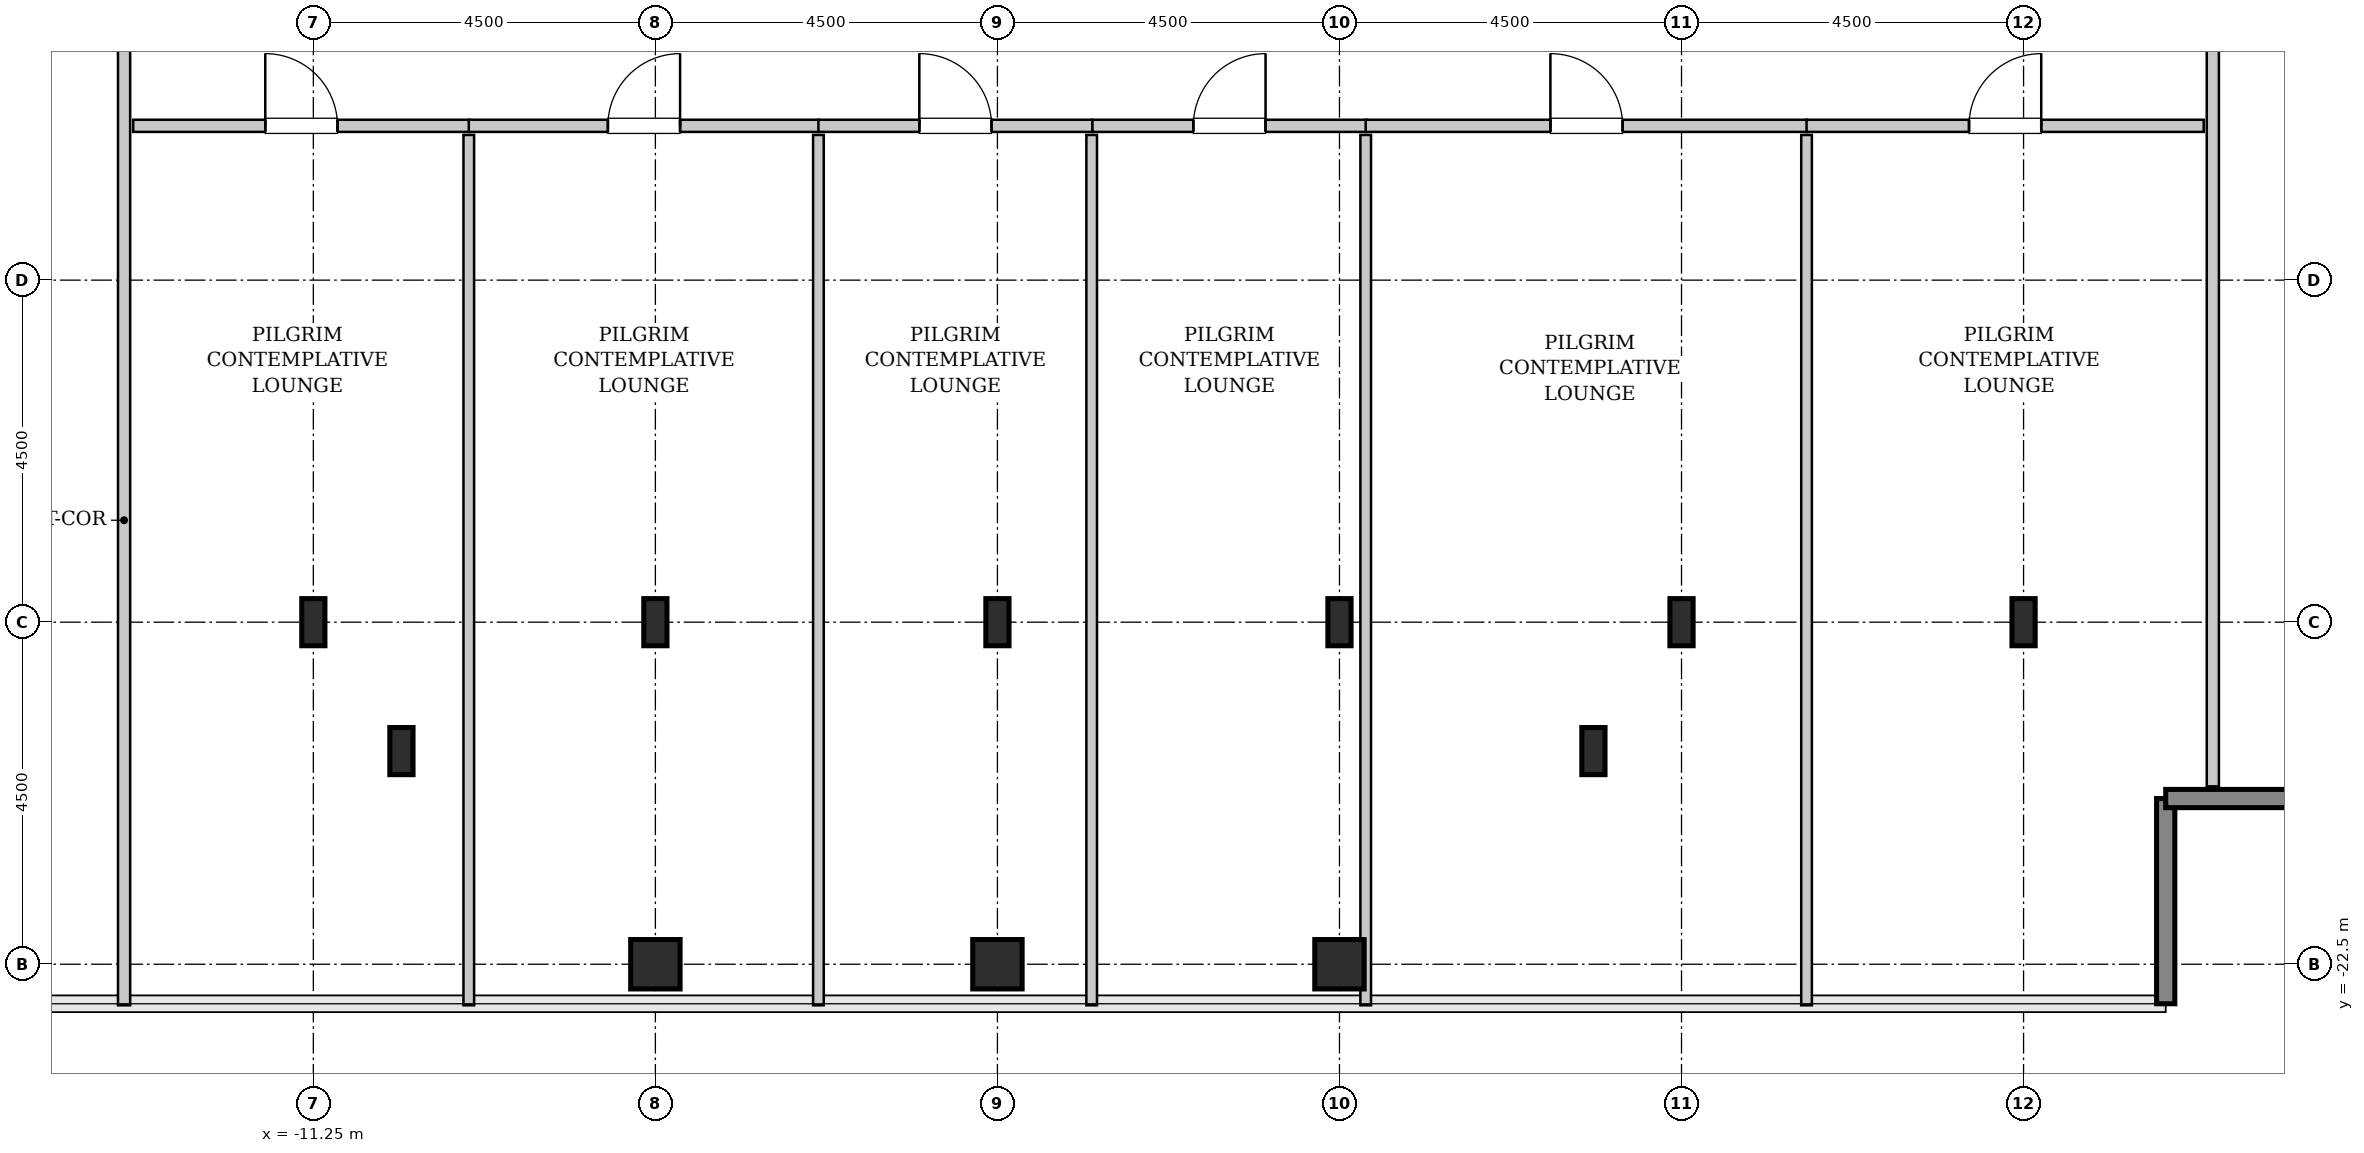
"""IFC4 building model, lengths in metres.
Left out: names, types, materials, properties, quantities, classifications, styles, units other than length and angle.
Written with IfcOpenShell. Run it as: python <this file> out.ifc"""

import sys

from ifc_helpers import new_model, si_unit, direction, frame, frame_2d, origin, origin_2d, place, context, subcontext, project, spatial, rectangle, hollow_rectangle, i_section, extrude, source, transform, mapped, element, fill, save


model = new_model("IFC4")
c1 = context("Model", 3, precision=1e-05, world=origin(), true_north=direction((0.0, 1.0)))
c2 = subcontext(c1, "Body", "Model", "MODEL_VIEW")
j1 = project(units=[si_unit("LENGTHUNIT", "METRE"), si_unit("PLANEANGLEUNIT", "RADIAN")], contexts=[c1])
p1 = place(None, origin())
s1 = spatial("IfcSite", under=j1, at=p1, CompositionType="ELEMENT")
p2 = place(p1, origin())
s2 = spatial("IfcBuilding", under=s1, at=p2, CompositionType="ELEMENT")
p3 = place(p2, frame((0.0, 0.0, 272.2)))
s3 = spatial("IfcBuildingStorey", under=s2, at=p3, CompositionType="ELEMENT", Elevation=272.2)
m1 = source(origin(), c2, "Body", "SweptSolid", [
    extrude(i_section(OverallWidth=0.305, OverallDepth=0.62, WebThickness=0.021, FlangeThickness=0.04, FilletRadius=0.027, at=origin_2d()), origin(), (0.0, 0.0, 1.0), 3.8),
])
for number, where, z_axis, x_axis in (
    (1, (-11.25, -18.0, 0.0), (0.0, 0.0, 1.0), (1.0, 0.0, 0.0)),
    (2, (-10.091, -19.696, 0.0), (0.0, 0.0, 1.0), (1.0, 0.0, 0.0)),
):
    element("IfcColumn", number, at=place(p3, frame(where, z_axis=z_axis, x_axis=x_axis)), inside=s3, PredefinedType="COLUMN", context=c2, shape_type="MappedRepresentation", body=[
        mapped(m1, transform((0.0, 0.0, 0.0), x_axis=(1.0, 0.0, 0.0), y_axis=(0.0, 1.0, 0.0), z_axis=(0.0, 0.0, 1.0), scale=1.0)),
    ])
m2 = source(origin(), c2, "Body", "SweptSolid", [
    extrude(hollow_rectangle(XDim=0.65, YDim=0.65, WallThickness=0.032, InnerFilletRadius=0.032, OuterFilletRadius=0.064, at=origin_2d()), origin(), (0.0, 0.0, 1.0), 3.8),
])
p4 = place(p3, frame((-6.75, -22.5, 0.0), z_axis=(0.0, 0.0, 1.0), x_axis=(1.0, 0.0, 0.0)))
e3 = element("IfcColumn", 3, at=p4, inside=s3, PredefinedType="COLUMN", context=c2, shape_type="MappedRepresentation", body=[
    mapped(m2, transform((0.0, 0.0, 0.0), x_axis=(1.0, 0.0, 0.0), y_axis=(0.0, 1.0, 0.0), z_axis=(0.0, 0.0, 1.0), scale=1.0)),
])
p5 = place(p3, frame((-6.75, -18.0, 0.0), z_axis=(0.0, 0.0, 1.0), x_axis=(1.0, 0.0, 0.0)))
e4 = element("IfcColumn", 4, at=p5, inside=s3, PredefinedType="COLUMN", context=c2, shape_type="MappedRepresentation", body=[
    mapped(m1, transform((0.0, 0.0, 0.0), x_axis=(1.0, 0.0, 0.0), y_axis=(0.0, 1.0, 0.0), z_axis=(0.0, 0.0, 1.0), scale=1.0)),
])
p6 = place(p3, frame((-2.25, -22.5, 0.0), z_axis=(0.0, 0.0, 1.0), x_axis=(1.0, 0.0, 0.0)))
e5 = element("IfcColumn", 5, at=p6, inside=s3, PredefinedType="COLUMN", context=c2, shape_type="MappedRepresentation", body=[
    mapped(m2, transform((0.0, 0.0, 0.0), x_axis=(1.0, 0.0, 0.0), y_axis=(0.0, 1.0, 0.0), z_axis=(0.0, 0.0, 1.0), scale=1.0)),
])
p7 = place(p3, frame((-2.25, -18.0, 0.0), z_axis=(0.0, 0.0, 1.0), x_axis=(1.0, 0.0, 0.0)))
e6 = element("IfcColumn", 6, at=p7, inside=s3, PredefinedType="COLUMN", context=c2, shape_type="MappedRepresentation", body=[
    mapped(m1, transform((0.0, 0.0, 0.0), x_axis=(1.0, 0.0, 0.0), y_axis=(0.0, 1.0, 0.0), z_axis=(0.0, 0.0, 1.0), scale=1.0)),
])
p8 = place(p3, frame((2.25, -22.5, 0.0), z_axis=(0.0, 0.0, 1.0), x_axis=(1.0, 0.0, 0.0)))
e7 = element("IfcColumn", 7, at=p8, inside=s3, PredefinedType="COLUMN", context=c2, shape_type="MappedRepresentation", body=[
    mapped(m2, transform((0.0, 0.0, 0.0), x_axis=(1.0, 0.0, 0.0), y_axis=(0.0, 1.0, 0.0), z_axis=(0.0, 0.0, 1.0), scale=1.0)),
])
for number, where, z_axis, x_axis in (
    (8, (2.25, -18.0, 0.0), (0.0, 0.0, 1.0), (1.0, 0.0, 0.0)),
    (9, (5.591, -19.696, 0.0), (0.0, 0.0, 1.0), (1.0, 0.0, 0.0)),
    (10, (6.75, -18.0, 0.0), (0.0, 0.0, 1.0), (1.0, 0.0, 0.0)),
    (11, (11.25, -18.0, 0.0), (0.0, 0.0, 1.0), (1.0, 0.0, 0.0)),
):
    element("IfcColumn", number, at=place(p3, frame(where, z_axis=z_axis, x_axis=x_axis)), inside=s3, PredefinedType="COLUMN", context=c2, shape_type="MappedRepresentation", body=[
        mapped(m1, transform((0.0, 0.0, 0.0), x_axis=(1.0, 0.0, 0.0), y_axis=(0.0, 1.0, 0.0), z_axis=(0.0, 0.0, 1.0), scale=1.0)),
    ])
m3 = source(origin(), c2, "Body", "SweptSolid", [
    extrude(rectangle(XDim=2.7, YDim=0.24, at=frame_2d((1.35, 0.0))), origin(), (0.0, 0.0, 1.0), 3.55),
])
for number, where, z_axis, x_axis in (
    (12, (13.12, -23.02, 0.0), (0.0, 0.0, 1.0), (0.0, 1.0, 0.0)),
    (13, (13.12, -20.32, 0.0), (0.0, 0.0, 1.0), (1.0, 0.0, 0.0)),
):
    element("IfcWall", number, at=place(p3, frame(where, z_axis=z_axis, x_axis=x_axis)), inside=s3, PredefinedType="SHEAR", context=c2, shape_type="MappedRepresentation", body=[
        mapped(m3, transform((0.0, 0.0, 0.0), x_axis=(1.0, 0.0, 0.0), y_axis=(0.0, 1.0, 0.0), z_axis=(0.0, 0.0, 1.0), scale=1.0)),
    ])
m4 = source(origin(), c2, "Body", "SweptSolid", [
    extrude(rectangle(XDim=14.845, YDim=0.16, at=frame_2d((7.422, 0.0))), origin(), (0.0, 0.0, 1.0), 3.535),
])
p9 = place(p3, frame((-13.74, -23.04, 0.0), z_axis=(0.0, 0.0, 1.0), x_axis=(0.0, 1.0, 0.0)))
e14 = element("IfcWall", 14, at=p9, inside=s3, PredefinedType="PARTITIONING", context=c2, shape_type="MappedRepresentation", body=[
    mapped(m4, transform((0.0, 0.0, 0.0), x_axis=(1.0, 0.0, 0.0), y_axis=(0.0, 1.0, 0.0), z_axis=(0.0, 0.0, 1.0), scale=1.0)),
])
p10 = place(p9, frame((12.712, 0.0, 0.0)))
e15 = element("IfcOpeningElement", 15, at=p10, cuts=e14, PredefinedType="OPENING", context=c2, shape_type="SweptSolid", body=[
    extrude(rectangle(XDim=0.95, YDim=2.1, at=frame_2d((0.475, 1.05))), frame((0.0, 0.09, 0.0), z_axis=(0.0, -1.0, 0.0), x_axis=(1.0, 0.0, 0.0)), (0.0, 0.0, 1.0), 0.18),
])
m5 = source(origin(), c2, "Body", "SweptSolid", [
    extrude(rectangle(XDim=11.765, YDim=0.16, at=frame_2d((5.882, 0.0))), origin(), (0.0, 0.0, 1.0), 3.535),
])
p11 = place(p3, frame((13.74, -20.16, 0.0), z_axis=(0.0, 0.0, 1.0), x_axis=(0.0, 1.0, 0.0)))
e16 = element("IfcWall", 16, at=p11, inside=s3, PredefinedType="PARTITIONING", context=c2, shape_type="MappedRepresentation", body=[
    mapped(m5, transform((0.0, 0.0, 0.0), x_axis=(1.0, 0.0, 0.0), y_axis=(0.0, 1.0, 0.0), z_axis=(0.0, 0.0, 1.0), scale=1.0)),
])
p12 = place(p11, frame((9.732, 0.0, 0.0)))
e17 = element("IfcOpeningElement", 17, at=p12, cuts=e16, PredefinedType="OPENING", context=c2, shape_type="SweptSolid", body=[
    extrude(rectangle(XDim=0.95, YDim=2.1, at=frame_2d((0.475, 1.05))), frame((0.0, 0.09, 0.0), z_axis=(0.0, -1.0, 0.0), x_axis=(1.0, 0.0, 0.0)), (0.0, 0.0, 1.0), 0.18),
])
m6 = source(origin(), c2, "Body", "SweptSolid", [
    extrude(rectangle(XDim=4.425, YDim=0.16, at=frame_2d((2.212, 0.0))), origin(), (0.0, 0.0, 1.0), 3.535),
])
p13 = place(p3, frame((-13.62, -11.47, 0.0), z_axis=(0.0, 0.0, 1.0), x_axis=(1.0, 0.0, 0.0)))
e18 = element("IfcWall", 18, at=p13, inside=s3, PredefinedType="PARTITIONING", context=c2, shape_type="MappedRepresentation", body=[
    mapped(m6, transform((0.0, 0.0, 0.0), x_axis=(1.0, 0.0, 0.0), y_axis=(0.0, 1.0, 0.0), z_axis=(0.0, 0.0, 1.0), scale=1.0)),
])
p14 = place(p13, frame((1.738, 0.0, 0.0)))
e19 = element("IfcOpeningElement", 19, at=p14, cuts=e18, PredefinedType="OPENING", context=c2, shape_type="SweptSolid", body=[
    extrude(rectangle(XDim=0.95, YDim=2.1, at=frame_2d((0.475, 1.05))), frame((0.0, 0.09, 0.0), z_axis=(0.0, -1.0, 0.0), x_axis=(1.0, 0.0, 0.0)), (0.0, 0.0, 1.0), 0.18),
])
m7 = source(origin(), c2, "Body", "SweptSolid", [
    extrude(rectangle(XDim=11.45, YDim=0.14, at=frame_2d((5.725, 0.0))), origin(), (0.0, 0.0, 1.0), 3.535),
])
p15 = place(p3, frame((-9.205, -23.04, 0.0), z_axis=(0.0, 0.0, 1.0), x_axis=(0.0, 1.0, 0.0)))
e20 = element("IfcWall", 20, at=p15, inside=s3, PredefinedType="PARTITIONING", context=c2, shape_type="MappedRepresentation", body=[
    mapped(m7, transform((0.0, 0.0, 0.0), x_axis=(1.0, 0.0, 0.0), y_axis=(0.0, 1.0, 0.0), z_axis=(0.0, 0.0, 1.0), scale=1.0)),
])
m8 = source(origin(), c2, "Body", "SweptSolid", [
    extrude(rectangle(XDim=4.61, YDim=0.16, at=frame_2d((2.305, 0.0))), origin(), (0.0, 0.0, 1.0), 3.535),
])
p16 = place(p3, frame((-9.205, -11.47, 0.0), z_axis=(0.0, 0.0, 1.0), x_axis=(1.0, 0.0, 0.0)))
e21 = element("IfcWall", 21, at=p16, inside=s3, PredefinedType="PARTITIONING", context=c2, shape_type="MappedRepresentation", body=[
    mapped(m8, transform((0.0, 0.0, 0.0), x_axis=(1.0, 0.0, 0.0), y_axis=(0.0, 1.0, 0.0), z_axis=(0.0, 0.0, 1.0), scale=1.0)),
])
p17 = place(p16, frame((1.83, 0.0, 0.0)))
e22 = element("IfcOpeningElement", 22, at=p17, cuts=e21, PredefinedType="OPENING", context=c2, shape_type="SweptSolid", body=[
    extrude(rectangle(XDim=0.95, YDim=2.1, at=frame_2d((0.475, 1.05))), frame((0.0, 0.09, 0.0), z_axis=(0.0, -1.0, 0.0), x_axis=(1.0, 0.0, 0.0)), (0.0, 0.0, 1.0), 0.18),
])
p18 = place(p3, frame((-4.605, -23.04, 0.0), z_axis=(0.0, 0.0, 1.0), x_axis=(0.0, 1.0, 0.0)))
e23 = element("IfcWall", 23, at=p18, inside=s3, PredefinedType="PARTITIONING", context=c2, shape_type="MappedRepresentation", body=[
    mapped(m7, transform((0.0, 0.0, 0.0), x_axis=(1.0, 0.0, 0.0), y_axis=(0.0, 1.0, 0.0), z_axis=(0.0, 0.0, 1.0), scale=1.0)),
])
m9 = source(origin(), c2, "Body", "SweptSolid", [
    extrude(rectangle(XDim=3.605, YDim=0.16, at=frame_2d((1.802, 0.0))), origin(), (0.0, 0.0, 1.0), 3.535),
])
p19 = place(p3, frame((-4.605, -11.47, 0.0), z_axis=(0.0, 0.0, 1.0), x_axis=(1.0, 0.0, 0.0)))
e24 = element("IfcWall", 24, at=p19, inside=s3, PredefinedType="PARTITIONING", context=c2, shape_type="MappedRepresentation", body=[
    mapped(m9, transform((0.0, 0.0, 0.0), x_axis=(1.0, 0.0, 0.0), y_axis=(0.0, 1.0, 0.0), z_axis=(0.0, 0.0, 1.0), scale=1.0)),
])
p20 = place(p19, frame((1.327, 0.0, 0.0)))
e25 = element("IfcOpeningElement", 25, at=p20, cuts=e24, PredefinedType="OPENING", context=c2, shape_type="SweptSolid", body=[
    extrude(rectangle(XDim=0.95, YDim=2.1, at=frame_2d((0.475, 1.05))), frame((0.0, 0.09, 0.0), z_axis=(0.0, -1.0, 0.0), x_axis=(1.0, 0.0, 0.0)), (0.0, 0.0, 1.0), 0.18),
])
p21 = place(p3, frame((-1.01, -23.04, 0.0), z_axis=(0.0, 0.0, 1.0), x_axis=(0.0, 1.0, 0.0)))
e26 = element("IfcWall", 26, at=p21, inside=s3, PredefinedType="PARTITIONING", context=c2, shape_type="MappedRepresentation", body=[
    mapped(m7, transform((0.0, 0.0, 0.0), x_axis=(1.0, 0.0, 0.0), y_axis=(0.0, 1.0, 0.0), z_axis=(0.0, 0.0, 1.0), scale=1.0)),
])
p22 = place(p3, frame((-1.0, -11.47, 0.0), z_axis=(0.0, 0.0, 1.0), x_axis=(1.0, 0.0, 0.0)))
e27 = element("IfcWall", 27, at=p22, inside=s3, PredefinedType="PARTITIONING", context=c2, shape_type="MappedRepresentation", body=[
    mapped(m9, transform((0.0, 0.0, 0.0), x_axis=(1.0, 0.0, 0.0), y_axis=(0.0, 1.0, 0.0), z_axis=(0.0, 0.0, 1.0), scale=1.0)),
])
p23 = place(p22, frame((1.327, 0.0, 0.0)))
e28 = element("IfcOpeningElement", 28, at=p23, cuts=e27, PredefinedType="OPENING", context=c2, shape_type="SweptSolid", body=[
    extrude(rectangle(XDim=0.95, YDim=2.1, at=frame_2d((0.475, 1.05))), frame((0.0, 0.09, 0.0), z_axis=(0.0, -1.0, 0.0), x_axis=(1.0, 0.0, 0.0)), (0.0, 0.0, 1.0), 0.18),
])
m10 = source(origin(), c2, "Body", "SweptSolid", [
    extrude(rectangle(XDim=11.45, YDim=0.14, at=frame_2d((5.725, 0.0))), origin(), (0.0, 0.0, 1.0), 2.925),
])
p24 = place(p3, frame((2.595, -23.04, 0.0), z_axis=(0.0, 0.0, 1.0), x_axis=(0.0, 1.0, 0.0)))
e29 = element("IfcWall", 29, at=p24, inside=s3, PredefinedType="PARTITIONING", context=c2, shape_type="MappedRepresentation", body=[
    mapped(m10, transform((0.0, 0.0, 0.0), x_axis=(1.0, 0.0, 0.0), y_axis=(0.0, 1.0, 0.0), z_axis=(0.0, 0.0, 1.0), scale=1.0)),
])
m11 = source(origin(), c2, "Body", "SweptSolid", [
    extrude(rectangle(XDim=5.81, YDim=0.16, at=frame_2d((2.905, 0.0))), origin(), (0.0, 0.0, 1.0), 3.535),
])
p25 = place(p3, frame((2.595, -11.47, 0.0), z_axis=(0.0, 0.0, 1.0), x_axis=(1.0, 0.0, 0.0)))
e30 = element("IfcWall", 30, at=p25, inside=s3, PredefinedType="PARTITIONING", context=c2, shape_type="MappedRepresentation", body=[
    mapped(m11, transform((0.0, 0.0, 0.0), x_axis=(1.0, 0.0, 0.0), y_axis=(0.0, 1.0, 0.0), z_axis=(0.0, 0.0, 1.0), scale=1.0)),
])
p26 = place(p25, frame((2.43, 0.0, 0.0)))
e31 = element("IfcOpeningElement", 31, at=p26, cuts=e30, PredefinedType="OPENING", context=c2, shape_type="SweptSolid", body=[
    extrude(rectangle(XDim=0.95, YDim=2.1, at=frame_2d((0.475, 1.05))), frame((0.0, 0.09, 0.0), z_axis=(0.0, -1.0, 0.0), x_axis=(1.0, 0.0, 0.0)), (0.0, 0.0, 1.0), 0.18),
])
p27 = place(p3, frame((8.395, -23.04, 0.0), z_axis=(0.0, 0.0, 1.0), x_axis=(0.0, 1.0, 0.0)))
e32 = element("IfcWall", 32, at=p27, inside=s3, PredefinedType="PARTITIONING", context=c2, shape_type="MappedRepresentation", body=[
    mapped(m7, transform((0.0, 0.0, 0.0), x_axis=(1.0, 0.0, 0.0), y_axis=(0.0, 1.0, 0.0), z_axis=(0.0, 0.0, 1.0), scale=1.0)),
])
m12 = source(origin(), c2, "Body", "SweptSolid", [
    extrude(rectangle(XDim=5.225, YDim=0.16, at=frame_2d((2.613, 0.0))), origin(), (0.0, 0.0, 1.0), 3.535),
])
p28 = place(p3, frame((8.395, -11.47, 0.0), z_axis=(0.0, 0.0, 1.0), x_axis=(1.0, 0.0, 0.0)))
e33 = element("IfcWall", 33, at=p28, inside=s3, PredefinedType="PARTITIONING", context=c2, shape_type="MappedRepresentation", body=[
    mapped(m12, transform((0.0, 0.0, 0.0), x_axis=(1.0, 0.0, 0.0), y_axis=(0.0, 1.0, 0.0), z_axis=(0.0, 0.0, 1.0), scale=1.0)),
])
p29 = place(p28, frame((2.137, 0.0, 0.0)))
e34 = element("IfcOpeningElement", 34, at=p29, cuts=e33, PredefinedType="OPENING", context=c2, shape_type="SweptSolid", body=[
    extrude(rectangle(XDim=0.95, YDim=2.1, at=frame_2d((0.475, 1.05))), frame((0.0, 0.09, 0.0), z_axis=(0.0, -1.0, 0.0), x_axis=(1.0, 0.0, 0.0)), (0.0, 0.0, 1.0), 0.18),
])
m13 = source(origin(), c2, "Body", "SweptSolid", [
    extrude(rectangle(XDim=0.95, YDim=2.1, at=frame_2d((0.475, 1.05))), frame((0.0, 0.025, 0.0), z_axis=(0.0, -1.0, 0.0), x_axis=(1.0, 0.0, 0.0)), (0.0, 0.0, 1.0), 0.05),
])
p30 = place(p14, origin())
e35 = element("IfcDoor", 35, at=p30, inside=s3, OperationType="SINGLE_SWING_LEFT", PredefinedType="DOOR", context=c2, shape_type="MappedRepresentation", body=[
    mapped(m13, transform((0.0, 0.0, 0.0), x_axis=(1.0, 0.0, 0.0), y_axis=(0.0, 1.0, 0.0), z_axis=(0.0, 0.0, 1.0), scale=1.0)),
])
fill(e19, e35)
p31 = place(p17, origin())
e36 = element("IfcDoor", 36, at=p31, inside=s3, OperationType="SINGLE_SWING_RIGHT", PredefinedType="DOOR", context=c2, shape_type="MappedRepresentation", body=[
    mapped(m13, transform((0.0, 0.0, 0.0), x_axis=(1.0, 0.0, 0.0), y_axis=(0.0, 1.0, 0.0), z_axis=(0.0, 0.0, 1.0), scale=1.0)),
])
fill(e22, e36)
p32 = place(p20, origin())
e37 = element("IfcDoor", 37, at=p32, inside=s3, OperationType="SINGLE_SWING_LEFT", PredefinedType="DOOR", context=c2, shape_type="MappedRepresentation", body=[
    mapped(m13, transform((0.0, 0.0, 0.0), x_axis=(1.0, 0.0, 0.0), y_axis=(0.0, 1.0, 0.0), z_axis=(0.0, 0.0, 1.0), scale=1.0)),
])
fill(e25, e37)
p33 = place(p23, origin())
e38 = element("IfcDoor", 38, at=p33, inside=s3, OperationType="SINGLE_SWING_RIGHT", PredefinedType="DOOR", context=c2, shape_type="MappedRepresentation", body=[
    mapped(m13, transform((0.0, 0.0, 0.0), x_axis=(1.0, 0.0, 0.0), y_axis=(0.0, 1.0, 0.0), z_axis=(0.0, 0.0, 1.0), scale=1.0)),
])
fill(e28, e38)
p34 = place(p26, origin())
e39 = element("IfcDoor", 39, at=p34, inside=s3, OperationType="SINGLE_SWING_LEFT", PredefinedType="DOOR", context=c2, shape_type="MappedRepresentation", body=[
    mapped(m13, transform((0.0, 0.0, 0.0), x_axis=(1.0, 0.0, 0.0), y_axis=(0.0, 1.0, 0.0), z_axis=(0.0, 0.0, 1.0), scale=1.0)),
])
fill(e31, e39)
p35 = place(p29, origin())
e40 = element("IfcDoor", 40, at=p35, inside=s3, OperationType="SINGLE_SWING_RIGHT", PredefinedType="DOOR", context=c2, shape_type="MappedRepresentation", body=[
    mapped(m13, transform((0.0, 0.0, 0.0), x_axis=(1.0, 0.0, 0.0), y_axis=(0.0, 1.0, 0.0), z_axis=(0.0, 0.0, 1.0), scale=1.0)),
])
fill(e34, e40)
save(model, sys.argv[1])
